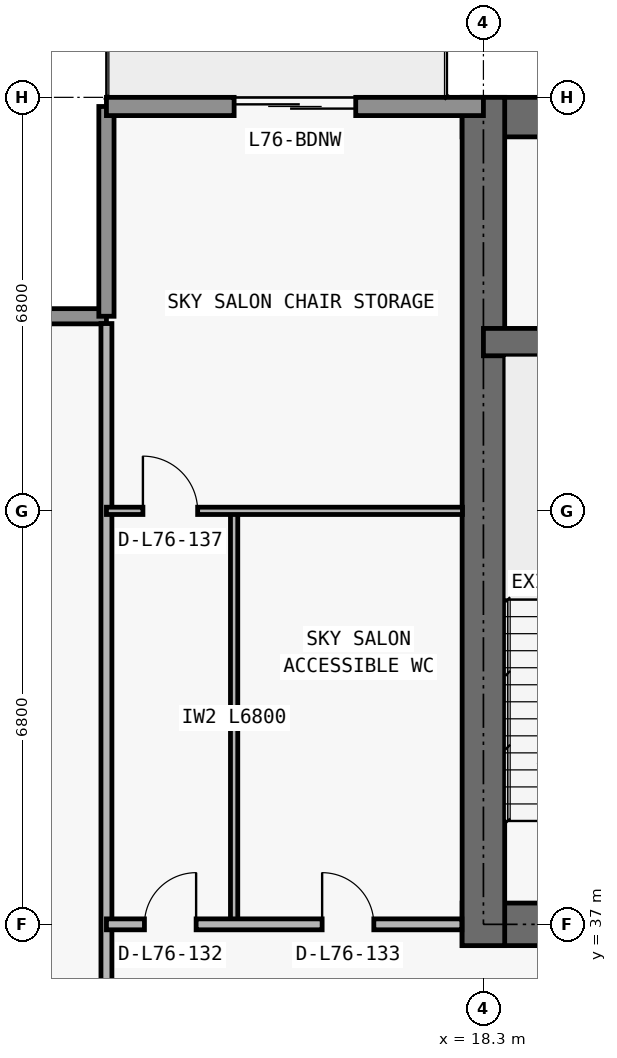
"""IFC4 building model, lengths in metres.
Left out: names, types, materials, properties, quantities, classifications, styles, units other than length and angle.
Written with IfcOpenShell. Run it as: python <this file> out.ifc"""

import sys

from ifc_helpers import new_model, si_unit, direction, frame, frame_2d, origin, place, context, subcontext, project, spatial, rectangle, extrude, element, fill, save


model = new_model("IFC4")
c1 = context("Model", 3, precision=1e-05, world=origin(), true_north=direction((0.0, 1.0)))
c2 = subcontext(c1, "Body", "Model", "MODEL_VIEW")
j1 = project(units=[si_unit("LENGTHUNIT", "METRE"), si_unit("PLANEANGLEUNIT", "RADIAN")], contexts=[c1])
p1 = place(None, origin())
s1 = spatial("IfcSite", under=j1, at=p1, CompositionType="ELEMENT")
p2 = place(p1, origin())
s2 = spatial("IfcBuilding", under=s1, at=p2, CompositionType="ELEMENT")
p3 = place(p2, frame((0.0, 0.0, 269.4)))
s3 = spatial("IfcBuildingStorey", under=s2, at=p3, CompositionType="ELEMENT", Elevation=269.4)
p4 = place(p3, frame((17.95, 37.0, 0.0), z_axis=(0.0, 0.0, 1.0), x_axis=(1.0, 0.0, 0.0)))
e1 = element("IfcWall", 1, at=p4, inside=s3, PredefinedType="SHEAR", context=c2, shape_type="SweptSolid", body=[
    extrude(rectangle(XDim=41.9, YDim=0.7, at=frame_2d((20.95, 0.0))), origin(), (0.0, 0.0, 1.0), 4.5),
])
p5 = place(p4, frame((14.35, 0.0, 0.0)))
e2 = element("IfcOpeningElement", 2, at=p5, cuts=e1, PredefinedType="OPENING", context=c2, shape_type="SweptSolid", body=[
    extrude(rectangle(XDim=1.1, YDim=2.15, at=frame_2d((0.55, 1.075))), frame((0.0, 0.36, 0.0), z_axis=(0.0, -1.0, 0.0), x_axis=(1.0, 0.0, 0.0)), (0.0, 0.0, 1.0), 0.72),
])
p6 = place(p4, frame((6.2, 0.0, 0.0)))
e3 = element("IfcOpeningElement", 3, at=p6, cuts=e1, PredefinedType="OPENING", context=c2, shape_type="SweptSolid", body=[
    extrude(rectangle(XDim=1.05, YDim=2.15, at=frame_2d((0.525, 1.075))), frame((0.0, 0.36, 0.0), z_axis=(0.0, -1.0, 0.0), x_axis=(1.0, 0.0, 0.0)), (0.0, 0.0, 1.0), 0.72),
])
p7 = place(p4, frame((34.7, 0.0, 0.0)))
e4 = element("IfcOpeningElement", 4, at=p7, cuts=e1, PredefinedType="OPENING", context=c2, shape_type="SweptSolid", body=[
    extrude(rectangle(XDim=1.05, YDim=2.15, at=frame_2d((0.525, 1.075))), frame((0.0, 0.36, 0.0), z_axis=(0.0, -1.0, 0.0), x_axis=(1.0, 0.0, 0.0)), (0.0, 0.0, 1.0), 0.72),
])
p8 = place(p4, frame((10.812, 0.0, 0.0)))
e5 = element("IfcOpeningElement", 5, at=p8, cuts=e1, PredefinedType="OPENING", context=c2, shape_type="SweptSolid", body=[
    extrude(rectangle(XDim=1.05, YDim=2.15, at=frame_2d((0.525, 1.075))), frame((0.0, 0.36, 0.0), z_axis=(0.0, -1.0, 0.0), x_axis=(1.0, 0.0, 0.0)), (0.0, 0.0, 1.0), 0.72),
])
p9 = place(p4, frame((24.05, 0.0, 0.0)))
e6 = element("IfcOpeningElement", 6, at=p9, cuts=e1, PredefinedType="OPENING", context=c2, shape_type="SweptSolid", body=[
    extrude(rectangle(XDim=1.05, YDim=2.15, at=frame_2d((0.525, 1.075))), frame((0.0, 0.36, 0.0), z_axis=(0.0, -1.0, 0.0), x_axis=(1.0, 0.0, 0.0)), (0.0, 0.0, 1.0), 0.72),
])
p10 = place(p3, frame((17.95, 50.275, 0.0), z_axis=(0.0, 0.0, 1.0), x_axis=(1.0, 0.0, 0.0)))
e7 = element("IfcWall", 7, at=p10, inside=s3, PredefinedType="SHEAR", context=c2, shape_type="SweptSolid", body=[
    extrude(rectangle(XDim=41.9, YDim=0.65, at=frame_2d((20.95, 0.0))), origin(), (0.0, 0.0, 1.0), 4.5),
])
p11 = place(p3, frame((18.3, 36.65, 0.0), z_axis=(0.0, 0.0, 1.0), x_axis=(0.0, 1.0, 0.0)))
e8 = element("IfcWall", 8, at=p11, inside=s3, PredefinedType="SHEAR", context=c2, shape_type="SweptSolid", body=[
    extrude(rectangle(XDim=13.95, YDim=0.7, at=frame_2d((6.975, 0.0))), origin(), (0.0, 0.0, 1.0), 4.5),
])
p12 = place(p3, frame((18.3, 46.575, 0.0), z_axis=(0.0, 0.0, 1.0), x_axis=(1.0, 0.0, 0.0)))
e9 = element("IfcWall", 9, at=p12, inside=s3, PredefinedType="SHEAR", context=c2, shape_type="SweptSolid", body=[
    extrude(rectangle(XDim=41.2, YDim=0.45, at=frame_2d((20.6, 0.0))), origin(), (0.0, 0.0, 1.0), 4.5),
])
p13 = place(p12, frame((7.575, 0.0, 0.0)))
e10 = element("IfcOpeningElement", 10, at=p13, cuts=e9, PredefinedType="OPENING", context=c2, shape_type="SweptSolid", body=[
    extrude(rectangle(XDim=1.05, YDim=2.15, at=frame_2d((0.525, 1.075))), frame((0.0, 0.235, 0.0), z_axis=(0.0, -1.0, 0.0), x_axis=(1.0, 0.0, 0.0)), (0.0, 0.0, 1.0), 0.47),
])
p14 = place(p12, frame((32.625, 0.0, 0.0)))
e11 = element("IfcOpeningElement", 11, at=p14, cuts=e9, PredefinedType="OPENING", context=c2, shape_type="SweptSolid", body=[
    extrude(rectangle(XDim=1.05, YDim=2.15, at=frame_2d((0.525, 1.075))), frame((0.0, 0.235, 0.0), z_axis=(0.0, -1.0, 0.0), x_axis=(1.0, 0.0, 0.0)), (0.0, 0.0, 1.0), 0.47),
])
p15 = place(p3, frame((8.25, 47.0, 0.0), z_axis=(0.0, 0.0, 1.0), x_axis=(1.0, 0.0, 0.0)))
e12 = element("IfcWall", 12, at=p15, inside=s3, PredefinedType="ELEMENTEDWALL", context=c2, shape_type="SweptSolid", body=[
    extrude(rectangle(XDim=3.85, YDim=0.25, at=frame_2d((1.925, 0.0))), origin(), (0.0, 0.0, 1.0), 4.5),
])
p16 = place(p3, frame((12.1, 47.0, 0.0), z_axis=(0.0, 0.0, 1.0), x_axis=(0.0, 1.0, 0.0)))
e13 = element("IfcWall", 13, at=p16, inside=s3, PredefinedType="ELEMENTEDWALL", context=c2, shape_type="SweptSolid", body=[
    extrude(rectangle(XDim=3.45, YDim=0.25, at=frame_2d((1.725, 0.0))), origin(), (0.0, 0.0, 1.0), 4.5),
])
p17 = place(p3, frame((12.1, 50.45, 0.0), z_axis=(0.0, 0.0, 1.0), x_axis=(1.0, 0.0, 0.0)))
e14 = element("IfcWall", 14, at=p17, inside=s3, PredefinedType="STANDARD", context=c2, shape_type="SweptSolid", body=[
    extrude(rectangle(XDim=6.2, YDim=0.3, at=frame_2d((3.1, 0.0))), origin(), (0.0, 0.0, 1.0), 4.5),
])
p18 = place(p17, frame((2.1, 0.0, 0.0)))
e15 = element("IfcOpeningElement", 15, at=p18, cuts=e14, PredefinedType="OPENING", context=c2, shape_type="SweptSolid", body=[
    extrude(rectangle(XDim=2.0, YDim=2.3, at=frame_2d((1.0, 1.15))), frame((0.0, 0.16, 0.0), z_axis=(0.0, -1.0, 0.0), x_axis=(1.0, 0.0, 0.0)), (0.0, 0.0, 1.0), 0.32),
])
p19 = place(p3, frame((12.1, 13.385, 0.0), z_axis=(0.0, 0.0, 1.0), x_axis=(0.0, 1.0, 0.0)))
e16 = element("IfcWall", 16, at=p19, inside=s3, PredefinedType="PARTITIONING", context=c2, shape_type="SweptSolid", body=[
    extrude(rectangle(XDim=33.495, YDim=0.18, at=frame_2d((16.748, 0.0))), origin(), (0.0, 0.0, 1.0), 4.5),
])
p20 = place(p3, frame((14.2, 37.0, 0.0), z_axis=(0.0, 0.0, 1.0), x_axis=(0.0, 1.0, 0.0)))
e17 = element("IfcWall", 17, at=p20, inside=s3, PredefinedType="PARTITIONING", context=c2, shape_type="SweptSolid", body=[
    extrude(rectangle(XDim=6.8, YDim=0.12, at=frame_2d((3.4, 0.0))), origin(), (0.0, 0.0, 1.0), 4.5),
])
p21 = place(p3, frame((12.1, 37.0, 0.0), z_axis=(0.0, 0.0, 1.0), x_axis=(1.0, 0.0, 0.0)))
e18 = element("IfcWall", 18, at=p21, inside=s3, PredefinedType="PARTITIONING", context=c2, shape_type="SweptSolid", body=[
    extrude(rectangle(XDim=5.845, YDim=0.18, at=frame_2d((2.922, 0.0))), origin(), (0.0, 0.0, 1.0), 4.5),
])
p22 = place(p21, frame((0.625, 0.0, 0.0)))
e19 = element("IfcOpeningElement", 19, at=p22, cuts=e18, PredefinedType="OPENING", context=c2, shape_type="SweptSolid", body=[
    extrude(rectangle(XDim=0.85, YDim=2.1, at=frame_2d((0.425, 1.05))), frame((0.0, 0.1, 0.0), z_axis=(0.0, -1.0, 0.0), x_axis=(1.0, 0.0, 0.0)), (0.0, 0.0, 1.0), 0.2),
])
p23 = place(p21, frame((3.548, 0.0, 0.0)))
e20 = element("IfcOpeningElement", 20, at=p23, cuts=e18, PredefinedType="OPENING", context=c2, shape_type="SweptSolid", body=[
    extrude(rectangle(XDim=0.85, YDim=2.1, at=frame_2d((0.425, 1.05))), frame((0.0, 0.1, 0.0), z_axis=(0.0, -1.0, 0.0), x_axis=(1.0, 0.0, 0.0)), (0.0, 0.0, 1.0), 0.2),
])
p24 = place(p3, frame((12.1, 43.8, 0.0), z_axis=(0.0, 0.0, 1.0), x_axis=(1.0, 0.0, 0.0)))
e21 = element("IfcWall", 21, at=p24, inside=s3, PredefinedType="PARTITIONING", context=c2, shape_type="SweptSolid", body=[
    extrude(rectangle(XDim=5.855, YDim=0.12, at=frame_2d((2.927, 0.0))), origin(), (0.0, 0.0, 1.0), 4.5),
])
p25 = place(p24, frame((0.6, 0.0, 0.0)))
e22 = element("IfcOpeningElement", 22, at=p25, cuts=e21, PredefinedType="OPENING", context=c2, shape_type="SweptSolid", body=[
    extrude(rectangle(XDim=0.9, YDim=2.15, at=frame_2d((0.45, 1.075))), frame((0.0, 0.07, 0.0), z_axis=(0.0, -1.0, 0.0), x_axis=(1.0, 0.0, 0.0)), (0.0, 0.0, 1.0), 0.14),
])
p26 = place(p18, origin())
e23 = element("IfcDoor", 23, at=p26, inside=s3, OperationType="DOUBLE_DOOR_SLIDING", PredefinedType="DOOR", context=c2, shape_type="SweptSolid", body=[
    extrude(rectangle(XDim=2.0, YDim=2.3, at=frame_2d((1.0, 1.15))), frame((0.0, 0.025, 0.0), z_axis=(0.0, -1.0, 0.0), x_axis=(1.0, 0.0, 0.0)), (0.0, 0.0, 1.0), 0.05),
])
fill(e15, e23)
p27 = place(p22, origin())
e24 = element("IfcDoor", 24, at=p27, inside=s3, OperationType="SINGLE_SWING_RIGHT", PredefinedType="DOOR", context=c2, shape_type="SweptSolid", body=[
    extrude(rectangle(XDim=0.85, YDim=2.1, at=frame_2d((0.425, 1.05))), frame((0.0, 0.025, 0.0), z_axis=(0.0, -1.0, 0.0), x_axis=(1.0, 0.0, 0.0)), (0.0, 0.0, 1.0), 0.05),
])
fill(e19, e24)
p28 = place(p23, origin())
e25 = element("IfcDoor", 25, at=p28, inside=s3, OperationType="SINGLE_SWING_LEFT", PredefinedType="DOOR", context=c2, shape_type="SweptSolid", body=[
    extrude(rectangle(XDim=0.85, YDim=2.1, at=frame_2d((0.425, 1.05))), frame((0.0, 0.025, 0.0), z_axis=(0.0, -1.0, 0.0), x_axis=(1.0, 0.0, 0.0)), (0.0, 0.0, 1.0), 0.05),
])
fill(e20, e25)
p29 = place(p25, origin())
e26 = element("IfcDoor", 26, at=p29, inside=s3, OperationType="SINGLE_SWING_LEFT", PredefinedType="DOOR", context=c2, shape_type="SweptSolid", body=[
    extrude(rectangle(XDim=0.9, YDim=2.15, at=frame_2d((0.45, 1.075))), frame((0.0, 0.025, 0.0), z_axis=(0.0, -1.0, 0.0), x_axis=(1.0, 0.0, 0.0)), (0.0, 0.0, 1.0), 0.05),
])
fill(e22, e26)
save(model, sys.argv[1])
